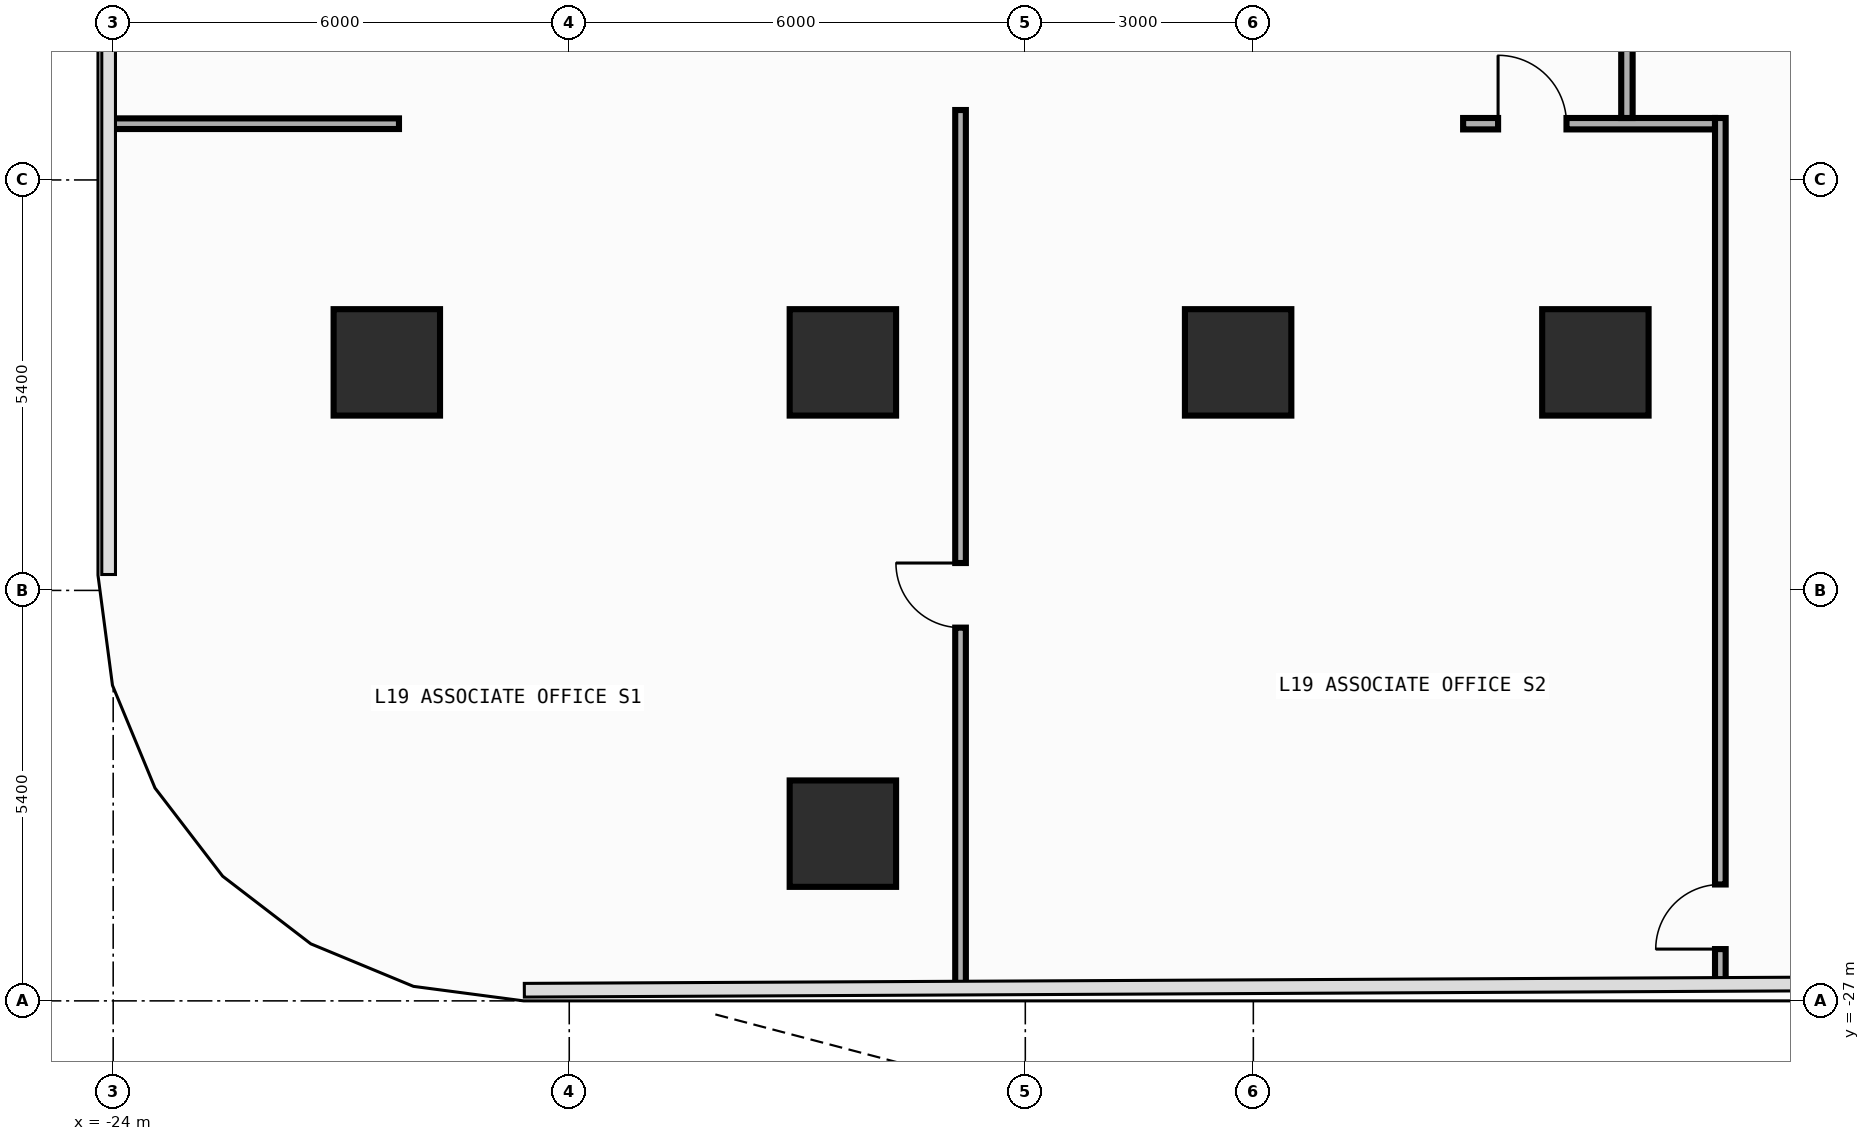
"""IFC4 building model, lengths in metres.
Left out: names, types, materials, properties, quantities, classifications, styles, units other than length and angle.
Written with IfcOpenShell. Run it as: python <this file> out.ifc"""

import sys

from ifc_helpers import new_model, si_unit, direction, frame, frame_2d, origin, origin_2d, place, context, subcontext, project, spatial, rectangle, extrude, element, fill, save


model = new_model("IFC4")
c1 = context("Model", 3, precision=1e-05, world=origin(), true_north=direction((0.0, 1.0)))
c2 = subcontext(c1, "Body", "Model", "MODEL_VIEW")
j1 = project(units=[si_unit("LENGTHUNIT", "METRE"), si_unit("PLANEANGLEUNIT", "RADIAN")], contexts=[c1])
p1 = place(None, origin())
s1 = spatial("IfcSite", under=j1, at=p1, CompositionType="ELEMENT")
p2 = place(p1, origin())
s2 = spatial("IfcBuilding", under=s1, at=p2, CompositionType="ELEMENT")
p3 = place(p2, frame((0.0, 0.0, 80.6)))
s3 = spatial("IfcBuildingStorey", under=s2, at=p3, CompositionType="ELEMENT", Elevation=80.6)
for number, where, z_axis, x_axis in (
    (1, (-9.2, -18.6, 0.0), (0.0, 0.0, 1.0), (1.0, 0.0, 0.0)),
    (2, (-20.4, -18.6, 0.0), (0.0, 0.0, 1.0), (1.0, 0.0, 0.0)),
    (3, (-14.4, -18.6, 0.0), (0.0, 0.0, 1.0), (1.0, 0.0, 0.0)),
    (4, (-4.5, -18.6, 0.0), (0.0, 0.0, 1.0), (1.0, 0.0, 0.0)),
    (5, (-14.4, -24.8, 0.0), (0.0, 0.0, 1.0), (1.0, 0.0, 0.0)),
):
    element("IfcColumn", number, at=place(p3, frame(where, z_axis=z_axis, x_axis=x_axis)), inside=s3, PredefinedType="COLUMN", context=c2, shape_type="SweptSolid", body=[
        extrude(rectangle(XDim=1.4, YDim=1.4, at=origin_2d()), origin(), (0.0, 0.0, 1.0), 4.2),
    ])
p4 = place(p3, frame((-6.24, -15.46, 0.0), z_axis=(0.0, 0.0, 1.0), x_axis=(1.0, 0.0, 0.0)))
e6 = element("IfcWall", 6, at=p4, inside=s3, PredefinedType="PARTITIONING", context=c2, shape_type="SweptSolid", body=[
    extrude(rectangle(XDim=3.314, YDim=0.15, at=frame_2d((1.657, 0.0))), origin(), (0.0, 0.0, 1.0), 3.85),
])
p5 = place(p4, frame((0.46, 0.0, 0.0)))
e7 = element("IfcOpeningElement", 7, at=p5, cuts=e6, PredefinedType="OPENING", context=c2, shape_type="SweptSolid", body=[
    extrude(rectangle(XDim=0.9, YDim=2.15, at=frame_2d((0.45, 1.075))), frame((0.0, 0.085, 0.0), z_axis=(0.0, -1.0, 0.0), x_axis=(1.0, 0.0, 0.0)), (0.0, 0.0, 1.0), 0.17),
])
p6 = place(p3, frame((-4.085, -15.385, 0.0), z_axis=(0.0, 0.0, 1.0), x_axis=(0.0, 1.0, 0.0)))
e8 = element("IfcWall", 8, at=p6, inside=s3, PredefinedType="PARTITIONING", context=c2, shape_type="SweptSolid", body=[
    extrude(rectangle(XDim=15.005, YDim=0.15, at=frame_2d((7.502, 0.0))), origin(), (0.0, 0.0, 1.0), 3.85),
])
p7 = place(p6, frame((9.588, 0.0, 0.0)))
e9 = element("IfcOpeningElement", 9, at=p7, cuts=e8, PredefinedType="OPENING", context=c2, shape_type="SweptSolid", body=[
    extrude(rectangle(XDim=0.9, YDim=2.15, at=frame_2d((0.45, 1.075))), frame((0.0, 0.085, 0.0), z_axis=(0.0, -1.0, 0.0), x_axis=(1.0, 0.0, 0.0)), (0.0, 0.0, 1.0), 0.17),
])
p8 = place(p3, frame((-24.055, -15.46, 0.0), z_axis=(0.0, 0.0, 1.0), x_axis=(1.0, 0.0, 0.0)))
e10 = element("IfcWall", 10, at=p8, inside=s3, PredefinedType="PARTITIONING", context=c2, shape_type="SweptSolid", body=[
    extrude(rectangle(XDim=3.815, YDim=0.14, at=frame_2d((1.907, 0.0))), origin(), (0.0, 0.0, 1.0), 3.85),
])
p9 = place(p3, frame((-12.852, -26.827, 0.0), z_axis=(0.0, 0.0, 1.0), x_axis=(0.0, 1.0, 0.0)))
e11 = element("IfcWall", 11, at=p9, inside=s3, PredefinedType="PARTITIONING", context=c2, shape_type="SweptSolid", body=[
    extrude(rectangle(XDim=11.547, YDim=0.14, at=frame_2d((5.773, 0.0))), origin(), (0.0, 0.0, 1.0), 3.85),
])
p10 = place(p9, frame((4.738, 0.0, 0.0)))
e12 = element("IfcOpeningElement", 12, at=p10, cuts=e11, PredefinedType="OPENING", context=c2, shape_type="SweptSolid", body=[
    extrude(rectangle(XDim=0.85, YDim=2.1, at=frame_2d((0.425, 1.05))), frame((0.0, 0.08, 0.0), z_axis=(0.0, -1.0, 0.0), x_axis=(1.0, 0.0, 0.0)), (0.0, 0.0, 1.0), 0.16),
])
p11 = place(p3, frame((-2.856, -26.779, 0.0), z_axis=(0.0, 0.0, 1.0), x_axis=(0.0, 1.0, 0.0)))
e13 = element("IfcWall", 13, at=p11, inside=s3, PredefinedType="PARTITIONING", context=c2, shape_type="SweptSolid", body=[
    extrude(rectangle(XDim=11.394, YDim=0.14, at=frame_2d((5.697, 0.0))), origin(), (0.0, 0.0, 1.0), 3.85),
])
p12 = place(p11, frame((0.46, 0.0, 0.0)))
e14 = element("IfcOpeningElement", 14, at=p12, cuts=e13, PredefinedType="OPENING", context=c2, shape_type="SweptSolid", body=[
    extrude(rectangle(XDim=0.85, YDim=2.1, at=frame_2d((0.425, 1.05))), frame((0.0, 0.08, 0.0), z_axis=(0.0, -1.0, 0.0), x_axis=(1.0, 0.0, 0.0)), (0.0, 0.0, 1.0), 0.16),
])
p13 = place(p5, origin())
e15 = element("IfcDoor", 15, at=p13, inside=s3, OperationType="SINGLE_SWING_LEFT", PredefinedType="DOOR", context=c2, shape_type="SweptSolid", body=[
    extrude(rectangle(XDim=0.9, YDim=2.15, at=frame_2d((0.45, 1.075))), frame((0.0, 0.025, 0.0), z_axis=(0.0, -1.0, 0.0), x_axis=(1.0, 0.0, 0.0)), (0.0, 0.0, 1.0), 0.05),
])
fill(e7, e15)
p14 = place(p10, origin())
e16 = element("IfcDoor", 16, at=p14, inside=s3, OperationType="SINGLE_SWING_RIGHT", PredefinedType="DOOR", context=c2, shape_type="SweptSolid", body=[
    extrude(rectangle(XDim=0.85, YDim=2.1, at=frame_2d((0.425, 1.05))), frame((0.0, 0.025, 0.0), z_axis=(0.0, -1.0, 0.0), x_axis=(1.0, 0.0, 0.0)), (0.0, 0.0, 1.0), 0.05),
])
fill(e12, e16)
p15 = place(p12, origin())
e17 = element("IfcDoor", 17, at=p15, inside=s3, OperationType="SINGLE_SWING_LEFT", PredefinedType="DOOR", context=c2, shape_type="SweptSolid", body=[
    extrude(rectangle(XDim=0.85, YDim=2.1, at=frame_2d((0.425, 1.05))), frame((0.0, 0.025, 0.0), z_axis=(0.0, -1.0, 0.0), x_axis=(1.0, 0.0, 0.0)), (0.0, 0.0, 1.0), 0.05),
])
fill(e14, e17)
save(model, sys.argv[1])
